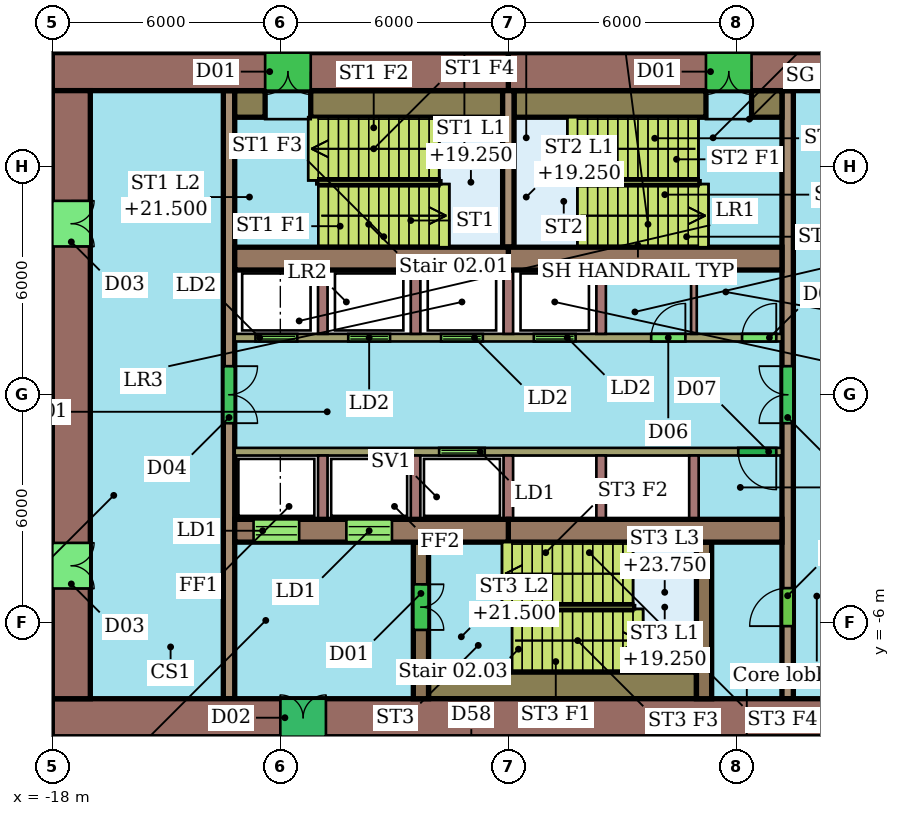
"""IFC4 building model, lengths in metres.
Left out: names, types, materials, properties, quantities, classifications, styles, units other than length and angle.
Written with IfcOpenShell. Run it as: python <this file> out.ifc"""

import sys

from ifc_helpers import new_model, si_unit, direction, frame, frame_2d, origin, place, context, subcontext, project, spatial, rectangle, extrude, element, fill, save


model = new_model("IFC4")
c1 = context("Model", 3, precision=1e-05, world=origin(), true_north=direction((0.0, 1.0)))
c2 = subcontext(c1, "Body", "Model", "MODEL_VIEW")
j1 = project(units=[si_unit("LENGTHUNIT", "METRE"), si_unit("PLANEANGLEUNIT", "RADIAN")], contexts=[c1])
p1 = place(None, origin())
s1 = spatial("IfcSite", under=j1, at=p1, CompositionType="ELEMENT")
p2 = place(p1, origin())
s2 = spatial("IfcBuilding", under=s1, at=p2, CompositionType="ELEMENT")
p3 = place(p2, frame((0.0, 0.0, 17.0)))
s3 = spatial("IfcBuildingStorey", under=s2, at=p3, CompositionType="ELEMENT", Elevation=17.0)
p4 = place(p3, frame((6.0, 8.5, 0.0), z_axis=(0.0, 0.0, 1.0), x_axis=(-1.0, 0.0, 0.0)))
e1 = element("IfcWall", 1, at=p4, inside=s3, PredefinedType="SHEAR", context=c2, shape_type="SweptSolid", body=[
    extrude(rectangle(XDim=12.0, YDim=1.0, at=frame_2d((6.0, 0.0))), origin(), (0.0, 0.0, 1.0), 8.7),
])
p5 = place(p4, frame((5.6, 0.0, 0.0)))
e2 = element("IfcOpeningElement", 2, at=p5, cuts=e1, PredefinedType="OPENING", context=c2, shape_type="SweptSolid", body=[
    extrude(rectangle(XDim=1.2, YDim=2.1, at=frame_2d((0.6, 1.05))), frame((0.0, 0.51, 0.0), z_axis=(0.0, -1.0, 0.0), x_axis=(1.0, 0.0, 0.0)), (0.0, 0.0, 1.0), 1.02),
])
p6 = place(p3, frame((-6.0, 8.5, 0.0), z_axis=(0.0, 0.0, 1.0), x_axis=(-1.0, 0.0, 0.0)))
e3 = element("IfcWall", 3, at=p6, inside=s3, PredefinedType="SHEAR", context=c2, shape_type="SweptSolid", body=[
    extrude(rectangle(XDim=12.0, YDim=1.0, at=frame_2d((6.0, 0.0))), origin(), (0.0, 0.0, 1.0), 8.7),
])
p7 = place(p6, frame((5.2, 0.0, 0.0)))
e4 = element("IfcOpeningElement", 4, at=p7, cuts=e3, PredefinedType="OPENING", context=c2, shape_type="SweptSolid", body=[
    extrude(rectangle(XDim=1.2, YDim=2.1, at=frame_2d((0.6, 1.05))), frame((0.0, 0.51, 0.0), z_axis=(0.0, -1.0, 0.0), x_axis=(1.0, 0.0, 0.0)), (0.0, 0.0, 1.0), 1.02),
])
p8 = place(p3, frame((-18.0, -8.5, 0.0), z_axis=(0.0, 0.0, 1.0), x_axis=(1.0, 0.0, 0.0)))
e5 = element("IfcWall", 5, at=p8, inside=s3, PredefinedType="SHEAR", context=c2, shape_type="SweptSolid", body=[
    extrude(rectangle(XDim=24.0, YDim=1.0, at=frame_2d((12.0, 0.0))), origin(), (0.0, 0.0, 1.0), 8.7),
])
p9 = place(p8, frame((6.0, 0.0, 0.0)))
e6 = element("IfcOpeningElement", 6, at=p9, cuts=e5, PredefinedType="OPENING", context=c2, shape_type="SweptSolid", body=[
    extrude(rectangle(XDim=1.2, YDim=2.1, at=frame_2d((0.6, 1.05))), frame((0.0, 0.51, 0.0), z_axis=(0.0, -1.0, 0.0), x_axis=(1.0, 0.0, 0.0)), (0.0, 0.0, 1.0), 1.02),
])
p10 = place(p3, frame((-17.5, 8.0, 0.0), z_axis=(0.0, 0.0, 1.0), x_axis=(0.0, -1.0, 0.0)))
e7 = element("IfcWall", 7, at=p10, inside=s3, PredefinedType="SHEAR", context=c2, shape_type="SweptSolid", body=[
    extrude(rectangle(XDim=16.0, YDim=1.0, at=frame_2d((8.0, 0.0))), origin(), (0.0, 0.0, 1.0), 8.7),
])
p11 = place(p10, frame((11.9, 0.0, 0.0)))
e8 = element("IfcOpeningElement", 8, at=p11, cuts=e7, PredefinedType="OPENING", context=c2, shape_type="SweptSolid", body=[
    extrude(rectangle(XDim=1.2, YDim=2.1, at=frame_2d((0.6, 1.05))), frame((0.0, 0.51, 0.0), z_axis=(0.0, -1.0, 0.0), x_axis=(1.0, 0.0, 0.0)), (0.0, 0.0, 1.0), 1.02),
])
p12 = place(p10, frame((2.9, 0.0, 0.0)))
e9 = element("IfcOpeningElement", 9, at=p12, cuts=e7, PredefinedType="OPENING", context=c2, shape_type="SweptSolid", body=[
    extrude(rectangle(XDim=1.2, YDim=2.1, at=frame_2d((0.6, 1.05))), frame((0.0, 0.51, 0.0), z_axis=(0.0, -1.0, 0.0), x_axis=(1.0, 0.0, 0.0)), (0.0, 0.0, 1.0), 1.02),
])
for number, where, z_axis, x_axis in (
    (10, (-13.2, 3.58, 0.0), (0.0, 0.0, 1.0), (1.0, 0.0, 0.0)),
    (11, (-6.0, 3.58, 0.0), (0.0, 0.0, 1.0), (1.0, 0.0, 0.0)),
):
    element("IfcWall", number, at=place(p3, frame(where, z_axis=z_axis, x_axis=x_axis)), inside=s3, PredefinedType="SHEAR", context=c2, shape_type="SweptSolid", body=[
        extrude(rectangle(XDim=7.2, YDim=0.6, at=frame_2d((3.6, 0.0))), origin(), (0.0, 0.0, 1.0), 8.7),
    ])
p13 = place(p3, frame((-13.2, -3.58, 0.0), z_axis=(0.0, 0.0, 1.0), x_axis=(1.0, 0.0, 0.0)))
e12 = element("IfcWall", 12, at=p13, inside=s3, PredefinedType="SHEAR", context=c2, shape_type="SweptSolid", body=[
    extrude(rectangle(XDim=7.2, YDim=0.6, at=frame_2d((3.6, 0.0))), origin(), (0.0, 0.0, 1.0), 8.7),
])
p14 = place(p13, frame((0.496, 0.0, 0.0)))
e13 = element("IfcOpeningElement", 13, at=p14, cuts=e12, PredefinedType="OPENING", context=c2, shape_type="SweptSolid", body=[
    extrude(rectangle(XDim=1.2, YDim=2.1, at=frame_2d((0.6, 1.05))), frame((0.0, 0.31, 0.0), z_axis=(0.0, -1.0, 0.0), x_axis=(1.0, 0.0, 0.0)), (0.0, 0.0, 1.0), 0.62),
])
p15 = place(p13, frame((2.938, 0.0, 0.0)))
e14 = element("IfcOpeningElement", 14, at=p15, cuts=e12, PredefinedType="OPENING", context=c2, shape_type="SweptSolid", body=[
    extrude(rectangle(XDim=1.2, YDim=2.1, at=frame_2d((0.6, 1.05))), frame((0.0, 0.31, 0.0), z_axis=(0.0, -1.0, 0.0), x_axis=(1.0, 0.0, 0.0)), (0.0, 0.0, 1.0), 0.62),
])
p16 = place(p3, frame((-6.0, -3.58, 0.0), z_axis=(0.0, 0.0, 1.0), x_axis=(1.0, 0.0, 0.0)))
e15 = element("IfcWall", 15, at=p16, inside=s3, PredefinedType="SHEAR", context=c2, shape_type="SweptSolid", body=[
    extrude(rectangle(XDim=7.2, YDim=0.6, at=frame_2d((3.6, 0.0))), origin(), (0.0, 0.0, 1.0), 8.7),
])
p17 = place(p3, frame((-13.35, 8.0, 0.0), z_axis=(0.0, 0.0, 1.0), x_axis=(0.0, -1.0, 0.0)))
e16 = element("IfcWall", 16, at=p17, inside=s3, PredefinedType="SHEAR", context=c2, shape_type="SweptSolid", body=[
    extrude(rectangle(XDim=16.0, YDim=0.3, at=frame_2d((8.0, 0.0))), origin(), (0.0, 0.0, 1.0), 8.7),
])
p18 = place(p17, frame((7.25, 0.0, 0.0)))
e17 = element("IfcOpeningElement", 17, at=p18, cuts=e16, PredefinedType="OPENING", context=c2, shape_type="SweptSolid", body=[
    extrude(rectangle(XDim=1.5, YDim=2.1, at=frame_2d((0.75, 1.05))), frame((0.0, 0.16, 0.0), z_axis=(0.0, -1.0, 0.0), x_axis=(1.0, 0.0, 0.0)), (0.0, 0.0, 1.0), 0.32),
])
p19 = place(p3, frame((1.35, -8.0, 0.0), z_axis=(0.0, 0.0, 1.0), x_axis=(0.0, 1.0, 0.0)))
e18 = element("IfcWall", 18, at=p19, inside=s3, PredefinedType="SHEAR", context=c2, shape_type="SweptSolid", body=[
    extrude(rectangle(XDim=16.0, YDim=0.3, at=frame_2d((8.0, 0.0))), origin(), (0.0, 0.0, 1.0), 8.7),
])
p20 = place(p19, frame((1.91, 0.0, 0.0)))
e19 = element("IfcOpeningElement", 19, at=p20, cuts=e18, PredefinedType="OPENING", context=c2, shape_type="SweptSolid", body=[
    extrude(rectangle(XDim=1.0, YDim=2.1, at=frame_2d((0.5, 1.05))), frame((0.0, 0.16, 0.0), z_axis=(0.0, -1.0, 0.0), x_axis=(1.0, 0.0, 0.0)), (0.0, 0.0, 1.0), 0.32),
])
p21 = place(p19, frame((7.25, 0.0, 0.0)))
e20 = element("IfcOpeningElement", 20, at=p21, cuts=e18, PredefinedType="OPENING", context=c2, shape_type="SweptSolid", body=[
    extrude(rectangle(XDim=1.5, YDim=2.1, at=frame_2d((0.75, 1.05))), frame((0.0, 0.16, 0.0), z_axis=(0.0, -1.0, 0.0), x_axis=(1.0, 0.0, 0.0)), (0.0, 0.0, 1.0), 0.32),
])
p22 = place(p3, frame((-13.2, 1.5, 0.0), z_axis=(0.0, 0.0, 1.0), x_axis=(1.0, 0.0, 0.0)))
e21 = element("IfcWall", 21, at=p22, inside=s3, PredefinedType="SHEAR", context=c2, shape_type="SweptSolid", body=[
    extrude(rectangle(XDim=14.4, YDim=0.2, at=frame_2d((7.2, 0.0))), origin(), (0.0, 0.0, 1.0), 8.7),
])
p23 = place(p22, frame((0.546, 0.0, 0.0)))
e22 = element("IfcOpeningElement", 22, at=p23, cuts=e21, PredefinedType="OPENING", context=c2, shape_type="SweptSolid", body=[
    extrude(rectangle(XDim=1.1, YDim=2.1, at=frame_2d((0.55, 1.05))), frame((0.0, 0.11, 0.0), z_axis=(0.0, -1.0, 0.0), x_axis=(1.0, 0.0, 0.0)), (0.0, 0.0, 1.0), 0.22),
])
p24 = place(p22, frame((2.988, 0.0, 0.0)))
e23 = element("IfcOpeningElement", 23, at=p24, cuts=e21, PredefinedType="OPENING", context=c2, shape_type="SweptSolid", body=[
    extrude(rectangle(XDim=1.1, YDim=2.1, at=frame_2d((0.55, 1.05))), frame((0.0, 0.11, 0.0), z_axis=(0.0, -1.0, 0.0), x_axis=(1.0, 0.0, 0.0)), (0.0, 0.0, 1.0), 0.22),
])
p25 = place(p22, frame((5.429, 0.0, 0.0)))
e24 = element("IfcOpeningElement", 24, at=p25, cuts=e21, PredefinedType="OPENING", context=c2, shape_type="SweptSolid", body=[
    extrude(rectangle(XDim=1.1, YDim=2.1, at=frame_2d((0.55, 1.05))), frame((0.0, 0.11, 0.0), z_axis=(0.0, -1.0, 0.0), x_axis=(1.0, 0.0, 0.0)), (0.0, 0.0, 1.0), 0.22),
])
p26 = place(p22, frame((7.871, 0.0, 0.0)))
e25 = element("IfcOpeningElement", 25, at=p26, cuts=e21, PredefinedType="OPENING", context=c2, shape_type="SweptSolid", body=[
    extrude(rectangle(XDim=1.1, YDim=2.1, at=frame_2d((0.55, 1.05))), frame((0.0, 0.11, 0.0), z_axis=(0.0, -1.0, 0.0), x_axis=(1.0, 0.0, 0.0)), (0.0, 0.0, 1.0), 0.22),
])
p27 = place(p22, frame((10.958, 0.0, 0.0)))
e26 = element("IfcOpeningElement", 26, at=p27, cuts=e21, PredefinedType="OPENING", context=c2, shape_type="SweptSolid", body=[
    extrude(rectangle(XDim=0.9, YDim=2.1, at=frame_2d((0.45, 1.05))), frame((0.0, 0.11, 0.0), z_axis=(0.0, -1.0, 0.0), x_axis=(1.0, 0.0, 0.0)), (0.0, 0.0, 1.0), 0.22),
])
p28 = place(p22, frame((13.35, 0.0, 0.0)))
e27 = element("IfcOpeningElement", 27, at=p28, cuts=e21, PredefinedType="OPENING", context=c2, shape_type="SweptSolid", body=[
    extrude(rectangle(XDim=0.9, YDim=2.1, at=frame_2d((0.45, 1.05))), frame((0.0, 0.11, 0.0), z_axis=(0.0, -1.0, 0.0), x_axis=(1.0, 0.0, 0.0)), (0.0, 0.0, 1.0), 0.22),
])
p29 = place(p3, frame((1.2, -1.5, 0.0), z_axis=(0.0, 0.0, 1.0), x_axis=(-1.0, 0.0, 0.0)))
e28 = element("IfcWall", 28, at=p29, inside=s3, PredefinedType="SHEAR", context=c2, shape_type="SweptSolid", body=[
    extrude(rectangle(XDim=14.4, YDim=0.2, at=frame_2d((7.2, 0.0))), origin(), (0.0, 0.0, 1.0), 8.7),
])
p30 = place(p29, frame((7.821, 0.0, 0.0)))
e29 = element("IfcOpeningElement", 29, at=p30, cuts=e28, PredefinedType="OPENING", context=c2, shape_type="SweptSolid", body=[
    extrude(rectangle(XDim=1.2, YDim=2.1, at=frame_2d((0.6, 1.05))), frame((0.0, 0.11, 0.0), z_axis=(0.0, -1.0, 0.0), x_axis=(1.0, 0.0, 0.0)), (0.0, 0.0, 1.0), 0.22),
])
p31 = place(p29, frame((0.15, 0.0, 0.0)))
e30 = element("IfcOpeningElement", 30, at=p31, cuts=e28, PredefinedType="OPENING", context=c2, shape_type="SweptSolid", body=[
    extrude(rectangle(XDim=1.0, YDim=2.1, at=frame_2d((0.5, 1.05))), frame((0.0, 0.11, 0.0), z_axis=(0.0, -1.0, 0.0), x_axis=(1.0, 0.0, 0.0)), (0.0, 0.0, 1.0), 0.22),
])
p32 = place(p3, frame((-8.3, -3.88, 0.0), z_axis=(0.0, 0.0, 1.0), x_axis=(0.0, -1.0, 0.0)))
e31 = element("IfcWall", 31, at=p32, inside=s3, PredefinedType="SHEAR", context=c2, shape_type="SweptSolid", body=[
    extrude(rectangle(XDim=4.12, YDim=0.4, at=frame_2d((2.06, 0.0))), origin(), (0.0, 0.0, 1.0), 8.7),
])
p33 = place(p32, frame((1.11, 0.0, 0.0)))
e32 = element("IfcOpeningElement", 32, at=p33, cuts=e31, PredefinedType="OPENING", context=c2, shape_type="SweptSolid", body=[
    extrude(rectangle(XDim=1.2, YDim=2.1, at=frame_2d((0.6, 1.05))), frame((0.0, 0.21, 0.0), z_axis=(0.0, -1.0, 0.0), x_axis=(1.0, 0.0, 0.0)), (0.0, 0.0, 1.0), 0.42),
])
p34 = place(p3, frame((-0.85, -3.88, 0.0), z_axis=(0.0, 0.0, 1.0), x_axis=(0.0, -1.0, 0.0)))
e33 = element("IfcWall", 33, at=p34, inside=s3, PredefinedType="SHEAR", context=c2, shape_type="SweptSolid", body=[
    extrude(rectangle(XDim=4.12, YDim=0.4, at=frame_2d((2.06, 0.0))), origin(), (0.0, 0.0, 1.0), 8.7),
])
p35 = place(p3, frame((-6.0, 3.88, 0.0), z_axis=(0.0, 0.0, 1.0), x_axis=(0.0, 1.0, 0.0)))
e34 = element("IfcWall", 34, at=p35, inside=s3, PredefinedType="SHEAR", context=c2, shape_type="SweptSolid", body=[
    extrude(rectangle(XDim=4.12, YDim=0.3, at=frame_2d((2.06, 0.0))), origin(), (0.0, 0.0, 1.0), 8.7),
])
p36 = place(p3, frame((-13.2, 7.65, 0.0), z_axis=(0.0, 0.0, 1.0), x_axis=(1.0, 0.0, 0.0)))
e35 = element("IfcWall", 35, at=p36, inside=s3, PredefinedType="SHEAR", context=c2, shape_type="SweptSolid", body=[
    extrude(rectangle(XDim=0.8, YDim=0.7, at=frame_2d((0.4, 0.0))), origin(), (0.0, 0.0, 1.0), 8.7),
])
for number, where, z_axis, x_axis in (
    (36, (-11.2, 7.65, 0.0), (0.0, 0.0, 1.0), (1.0, 0.0, 0.0)),
    (37, (-5.85, 7.65, 0.0), (0.0, 0.0, 1.0), (1.0, 0.0, 0.0)),
):
    element("IfcWall", number, at=place(p3, frame(where, z_axis=z_axis, x_axis=x_axis)), inside=s3, PredefinedType="SHEAR", context=c2, shape_type="SweptSolid", body=[
        extrude(rectangle(XDim=5.05, YDim=0.7, at=frame_2d((2.525, 0.0))), origin(), (0.0, 0.0, 1.0), 8.7),
    ])
p37 = place(p3, frame((0.4, 7.65, 0.0), z_axis=(0.0, 0.0, 1.0), x_axis=(1.0, 0.0, 0.0)))
e38 = element("IfcWall", 38, at=p37, inside=s3, PredefinedType="SHEAR", context=c2, shape_type="SweptSolid", body=[
    extrude(rectangle(XDim=0.8, YDim=0.7, at=frame_2d((0.4, 0.0))), origin(), (0.0, 0.0, 1.0), 8.7),
])
p38 = place(p3, frame((-8.1, -7.65, 0.0), z_axis=(0.0, 0.0, 1.0), x_axis=(1.0, 0.0, 0.0)))
e39 = element("IfcWall", 39, at=p38, inside=s3, PredefinedType="SHEAR", context=c2, shape_type="SweptSolid", body=[
    extrude(rectangle(XDim=7.05, YDim=0.7, at=frame_2d((3.525, 0.0))), origin(), (0.0, 0.0, 1.0), 8.7),
])
for number, where, z_axis, x_axis in (
    (40, (-10.883, 1.6, 0.0), (0.0, 0.0, 1.0), (0.0, 1.0, 0.0)),
    (41, (-8.442, 1.6, 0.0), (0.0, 0.0, 1.0), (0.0, 1.0, 0.0)),
    (42, (-6.0, 1.6, 0.0), (0.0, 0.0, 1.0), (0.0, 1.0, 0.0)),
    (43, (-3.558, 1.6, 0.0), (0.0, 0.0, 1.0), (0.0, 1.0, 0.0)),
):
    element("IfcWall", number, at=place(p3, frame(where, z_axis=z_axis, x_axis=x_axis)), inside=s3, PredefinedType="SHEAR", context=c2, shape_type="SweptSolid", body=[
        extrude(rectangle(XDim=1.68, YDim=0.25, at=frame_2d((0.84, 0.0))), origin(), (0.0, 0.0, 1.0), 8.7),
    ])
p39 = place(p3, frame((-1.117, 1.6, 0.0), z_axis=(0.0, 0.0, 1.0), x_axis=(0.0, 1.0, 0.0)))
e44 = element("IfcWall", 44, at=p39, inside=s3, PredefinedType="PARTITIONING", context=c2, shape_type="SweptSolid", body=[
    extrude(rectangle(XDim=1.68, YDim=0.15, at=frame_2d((0.84, 0.0))), origin(), (0.0, 0.0, 1.0), 8.7),
])
for number, where, z_axis, x_axis in (
    (45, (-10.883, -1.6, 0.0), (0.0, 0.0, 1.0), (0.0, -1.0, 0.0)),
    (46, (-8.442, -1.6, 0.0), (0.0, 0.0, 1.0), (0.0, -1.0, 0.0)),
    (47, (-6.0, -1.6, 0.0), (0.0, 0.0, 1.0), (0.0, -1.0, 0.0)),
    (48, (-3.558, -1.6, 0.0), (0.0, 0.0, 1.0), (0.0, -1.0, 0.0)),
    (49, (-1.117, -1.6, 0.0), (0.0, 0.0, 1.0), (0.0, -1.0, 0.0)),
):
    element("IfcWall", number, at=place(p3, frame(where, z_axis=z_axis, x_axis=x_axis)), inside=s3, PredefinedType="SHEAR", context=c2, shape_type="SweptSolid", body=[
        extrude(rectangle(XDim=1.68, YDim=0.25, at=frame_2d((0.84, 0.0))), origin(), (0.0, 0.0, 1.0), 8.7),
    ])
p40 = place(p5, origin())
e50 = element("IfcDoor", 50, at=p40, inside=s3, OperationType="DOUBLE_DOOR_SINGLE_SWING", PredefinedType="NOTDEFINED", context=c2, shape_type="SweptSolid", body=[
    extrude(rectangle(XDim=1.2, YDim=2.1, at=frame_2d((0.6, 1.05))), frame((0.0, 0.025, 0.0), z_axis=(0.0, -1.0, 0.0), x_axis=(1.0, 0.0, 0.0)), (0.0, 0.0, 1.0), 0.05),
])
fill(e2, e50)
p41 = place(p7, origin())
e51 = element("IfcDoor", 51, at=p41, inside=s3, OperationType="DOUBLE_DOOR_SINGLE_SWING", PredefinedType="NOTDEFINED", context=c2, shape_type="SweptSolid", body=[
    extrude(rectangle(XDim=1.2, YDim=2.1, at=frame_2d((0.6, 1.05))), frame((0.0, 0.025, 0.0), z_axis=(0.0, -1.0, 0.0), x_axis=(1.0, 0.0, 0.0)), (0.0, 0.0, 1.0), 0.05),
])
fill(e4, e51)
p42 = place(p9, origin())
e52 = element("IfcDoor", 52, at=p42, inside=s3, OperationType="DOUBLE_DOOR_SINGLE_SWING", PredefinedType="NOTDEFINED", context=c2, shape_type="SweptSolid", body=[
    extrude(rectangle(XDim=1.2, YDim=2.1, at=frame_2d((0.6, 1.05))), frame((0.0, 0.025, 0.0), z_axis=(0.0, -1.0, 0.0), x_axis=(1.0, 0.0, 0.0)), (0.0, 0.0, 1.0), 0.05),
])
fill(e6, e52)
p43 = place(p11, origin())
e53 = element("IfcDoor", 53, at=p43, inside=s3, OperationType="DOUBLE_DOOR_SINGLE_SWING", PredefinedType="NOTDEFINED", context=c2, shape_type="SweptSolid", body=[
    extrude(rectangle(XDim=1.2, YDim=2.1, at=frame_2d((0.6, 1.05))), frame((0.0, 0.025, 0.0), z_axis=(0.0, -1.0, 0.0), x_axis=(1.0, 0.0, 0.0)), (0.0, 0.0, 1.0), 0.05),
])
fill(e8, e53)
p44 = place(p12, origin())
e54 = element("IfcDoor", 54, at=p44, inside=s3, OperationType="DOUBLE_DOOR_SINGLE_SWING", PredefinedType="NOTDEFINED", context=c2, shape_type="SweptSolid", body=[
    extrude(rectangle(XDim=1.2, YDim=2.1, at=frame_2d((0.6, 1.05))), frame((0.0, 0.025, 0.0), z_axis=(0.0, -1.0, 0.0), x_axis=(1.0, 0.0, 0.0)), (0.0, 0.0, 1.0), 0.05),
])
fill(e9, e54)
p45 = place(p14, origin())
e55 = element("IfcDoor", 55, at=p45, inside=s3, OperationType="DOUBLE_DOOR_SLIDING", PredefinedType="NOTDEFINED", context=c2, shape_type="SweptSolid", body=[
    extrude(rectangle(XDim=1.2, YDim=2.1, at=frame_2d((0.6, 1.05))), frame((0.0, 0.025, 0.0), z_axis=(0.0, -1.0, 0.0), x_axis=(1.0, 0.0, 0.0)), (0.0, 0.0, 1.0), 0.05),
])
fill(e13, e55)
p46 = place(p15, origin())
e56 = element("IfcDoor", 56, at=p46, inside=s3, OperationType="DOUBLE_DOOR_SLIDING", PredefinedType="NOTDEFINED", context=c2, shape_type="SweptSolid", body=[
    extrude(rectangle(XDim=1.2, YDim=2.1, at=frame_2d((0.6, 1.05))), frame((0.0, 0.025, 0.0), z_axis=(0.0, -1.0, 0.0), x_axis=(1.0, 0.0, 0.0)), (0.0, 0.0, 1.0), 0.05),
])
fill(e14, e56)
p47 = place(p18, origin())
e57 = element("IfcDoor", 57, at=p47, inside=s3, OperationType="DOUBLE_DOOR_SINGLE_SWING", PredefinedType="NOTDEFINED", context=c2, shape_type="SweptSolid", body=[
    extrude(rectangle(XDim=1.5, YDim=2.1, at=frame_2d((0.75, 1.05))), frame((0.0, 0.025, 0.0), z_axis=(0.0, -1.0, 0.0), x_axis=(1.0, 0.0, 0.0)), (0.0, 0.0, 1.0), 0.05),
])
fill(e17, e57)
p48 = place(p20, origin())
e58 = element("IfcDoor", 58, at=p48, inside=s3, OperationType="SINGLE_SWING_LEFT", PredefinedType="NOTDEFINED", context=c2, shape_type="SweptSolid", body=[
    extrude(rectangle(XDim=1.0, YDim=2.1, at=frame_2d((0.5, 1.05))), frame((0.0, 0.025, 0.0), z_axis=(0.0, -1.0, 0.0), x_axis=(1.0, 0.0, 0.0)), (0.0, 0.0, 1.0), 0.05),
])
fill(e19, e58)
p49 = place(p21, origin())
e59 = element("IfcDoor", 59, at=p49, inside=s3, OperationType="DOUBLE_DOOR_SINGLE_SWING", PredefinedType="NOTDEFINED", context=c2, shape_type="SweptSolid", body=[
    extrude(rectangle(XDim=1.5, YDim=2.1, at=frame_2d((0.75, 1.05))), frame((0.0, 0.025, 0.0), z_axis=(0.0, -1.0, 0.0), x_axis=(1.0, 0.0, 0.0)), (0.0, 0.0, 1.0), 0.05),
])
fill(e20, e59)
p50 = place(p23, origin())
e60 = element("IfcDoor", 60, at=p50, inside=s3, OperationType="DOUBLE_DOOR_SLIDING", PredefinedType="NOTDEFINED", context=c2, shape_type="SweptSolid", body=[
    extrude(rectangle(XDim=1.1, YDim=2.1, at=frame_2d((0.55, 1.05))), frame((0.0, 0.025, 0.0), z_axis=(0.0, -1.0, 0.0), x_axis=(1.0, 0.0, 0.0)), (0.0, 0.0, 1.0), 0.05),
])
fill(e22, e60)
p51 = place(p24, origin())
e61 = element("IfcDoor", 61, at=p51, inside=s3, OperationType="DOUBLE_DOOR_SLIDING", PredefinedType="NOTDEFINED", context=c2, shape_type="SweptSolid", body=[
    extrude(rectangle(XDim=1.1, YDim=2.1, at=frame_2d((0.55, 1.05))), frame((0.0, 0.025, 0.0), z_axis=(0.0, -1.0, 0.0), x_axis=(1.0, 0.0, 0.0)), (0.0, 0.0, 1.0), 0.05),
])
fill(e23, e61)
p52 = place(p25, origin())
e62 = element("IfcDoor", 62, at=p52, inside=s3, OperationType="DOUBLE_DOOR_SLIDING", PredefinedType="NOTDEFINED", context=c2, shape_type="SweptSolid", body=[
    extrude(rectangle(XDim=1.1, YDim=2.1, at=frame_2d((0.55, 1.05))), frame((0.0, 0.025, 0.0), z_axis=(0.0, -1.0, 0.0), x_axis=(1.0, 0.0, 0.0)), (0.0, 0.0, 1.0), 0.05),
])
fill(e24, e62)
p53 = place(p26, origin())
e63 = element("IfcDoor", 63, at=p53, inside=s3, OperationType="DOUBLE_DOOR_SLIDING", PredefinedType="NOTDEFINED", context=c2, shape_type="SweptSolid", body=[
    extrude(rectangle(XDim=1.1, YDim=2.1, at=frame_2d((0.55, 1.05))), frame((0.0, 0.025, 0.0), z_axis=(0.0, -1.0, 0.0), x_axis=(1.0, 0.0, 0.0)), (0.0, 0.0, 1.0), 0.05),
])
fill(e25, e63)
p54 = place(p27, origin())
e64 = element("IfcDoor", 64, at=p54, inside=s3, OperationType="SINGLE_SWING_RIGHT", PredefinedType="NOTDEFINED", context=c2, shape_type="SweptSolid", body=[
    extrude(rectangle(XDim=0.9, YDim=2.1, at=frame_2d((0.45, 1.05))), frame((0.0, 0.025, 0.0), z_axis=(0.0, -1.0, 0.0), x_axis=(1.0, 0.0, 0.0)), (0.0, 0.0, 1.0), 0.05),
])
fill(e26, e64)
p55 = place(p28, origin())
e65 = element("IfcDoor", 65, at=p55, inside=s3, OperationType="SINGLE_SWING_RIGHT", PredefinedType="NOTDEFINED", context=c2, shape_type="SweptSolid", body=[
    extrude(rectangle(XDim=0.9, YDim=2.1, at=frame_2d((0.45, 1.05))), frame((0.0, 0.025, 0.0), z_axis=(0.0, -1.0, 0.0), x_axis=(1.0, 0.0, 0.0)), (0.0, 0.0, 1.0), 0.05),
])
fill(e27, e65)
p56 = place(p30, origin())
e66 = element("IfcDoor", 66, at=p56, inside=s3, OperationType="DOUBLE_DOOR_SLIDING", PredefinedType="NOTDEFINED", context=c2, shape_type="SweptSolid", body=[
    extrude(rectangle(XDim=1.2, YDim=2.1, at=frame_2d((0.6, 1.05))), frame((0.0, 0.025, 0.0), z_axis=(0.0, -1.0, 0.0), x_axis=(1.0, 0.0, 0.0)), (0.0, 0.0, 1.0), 0.05),
])
fill(e29, e66)
p57 = place(p31, origin())
e67 = element("IfcDoor", 67, at=p57, inside=s3, OperationType="SINGLE_SWING_LEFT", PredefinedType="NOTDEFINED", context=c2, shape_type="SweptSolid", body=[
    extrude(rectangle(XDim=1.0, YDim=2.1, at=frame_2d((0.5, 1.05))), frame((0.0, 0.025, 0.0), z_axis=(0.0, -1.0, 0.0), x_axis=(1.0, 0.0, 0.0)), (0.0, 0.0, 1.0), 0.05),
])
fill(e30, e67)
p58 = place(p33, origin())
e68 = element("IfcDoor", 68, at=p58, inside=s3, OperationType="DOUBLE_DOOR_SINGLE_SWING", PredefinedType="NOTDEFINED", context=c2, shape_type="SweptSolid", body=[
    extrude(rectangle(XDim=1.2, YDim=2.1, at=frame_2d((0.6, 1.05))), frame((0.0, 0.025, 0.0), z_axis=(0.0, -1.0, 0.0), x_axis=(1.0, 0.0, 0.0)), (0.0, 0.0, 1.0), 0.05),
])
fill(e32, e68)
save(model, sys.argv[1])
